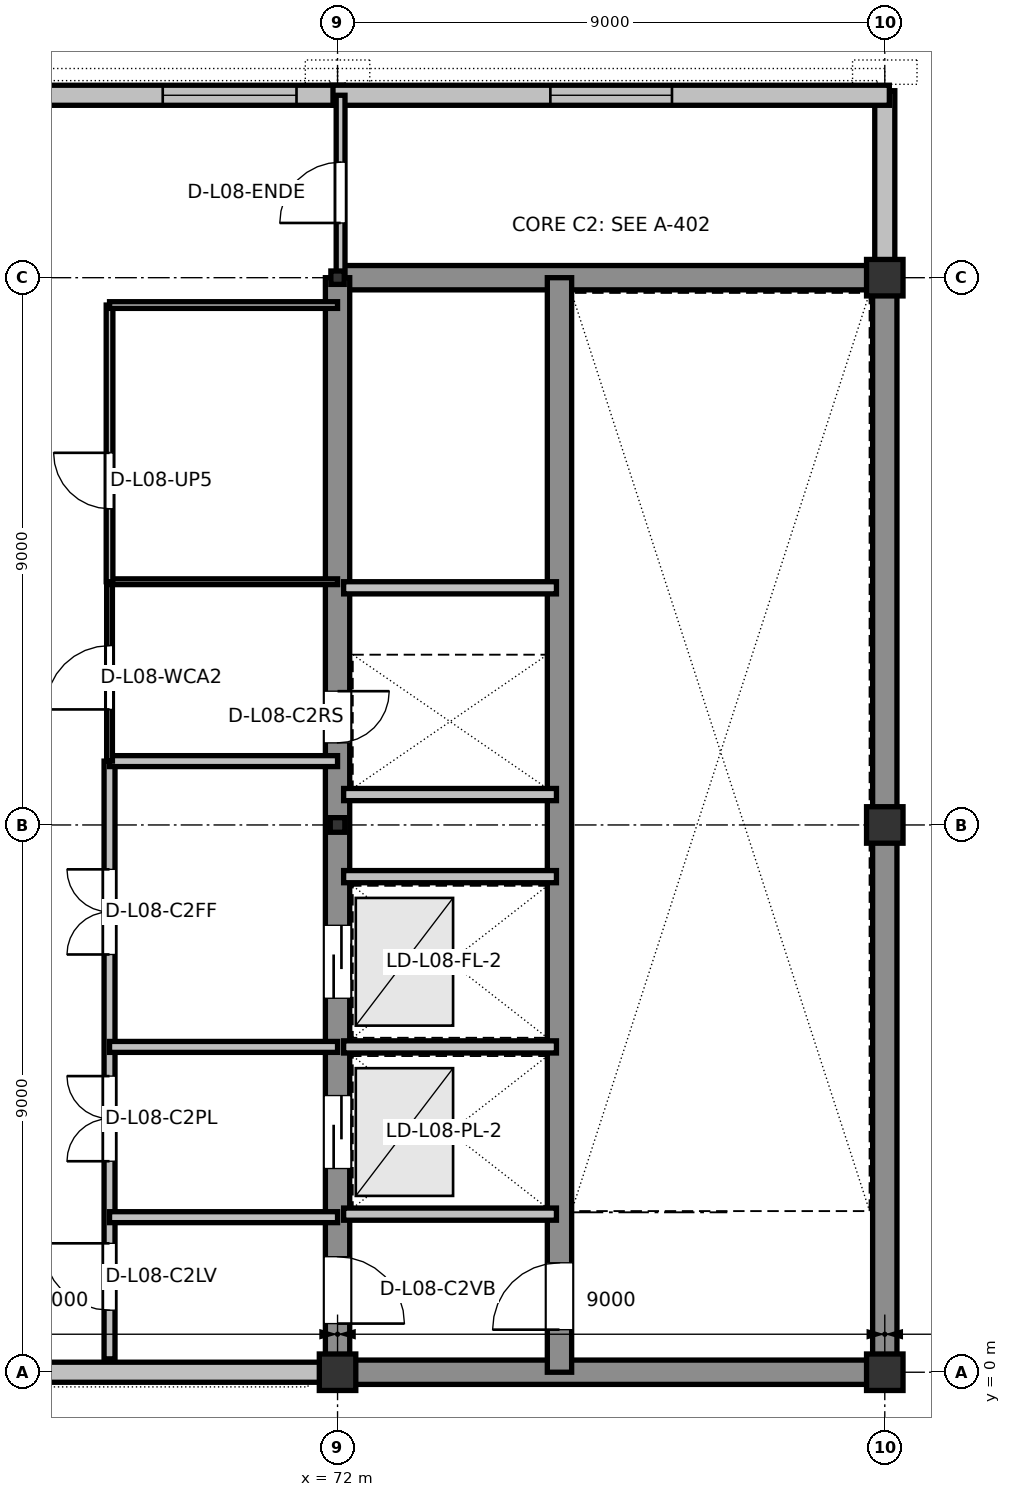
"""IFC4 building model, lengths in metres.
Left out: names, types, materials, properties, quantities, classifications, styles, units other than length and angle.
Written with IfcOpenShell. Run it as: python <this file> out.ifc"""

import sys

from ifc_helpers import new_model, si_unit, direction, frame, frame_2d, origin, origin_2d, place, context, subcontext, project, spatial, rectangle, hollow_rectangle, i_section, extrude, element, fill, save


model = new_model("IFC4")
c1 = context("Model", 3, precision=1e-05, world=origin(), true_north=direction((0.0, 1.0)))
c2 = subcontext(c1, "Body", "Model", "MODEL_VIEW")
j1 = project(units=[si_unit("LENGTHUNIT", "METRE"), si_unit("PLANEANGLEUNIT", "RADIAN")], contexts=[c1])
p1 = place(None, origin())
s1 = spatial("IfcSite", under=j1, at=p1, CompositionType="ELEMENT")
p2 = place(p1, origin())
s2 = spatial("IfcBuilding", under=s1, at=p2, CompositionType="ELEMENT")
p3 = place(p2, frame((0.0, 0.0, 36.0)))
s3 = spatial("IfcBuildingStorey", under=s2, at=p3, CompositionType="ELEMENT", Elevation=36.0)
p4 = place(p3, frame((72.0, 0.0, 0.0), z_axis=(0.0, 0.0, 1.0), x_axis=(1.0, 0.0, 0.0)))
e1 = element("IfcColumn", 1, at=p4, inside=s3, PredefinedType="COLUMN", context=c2, shape_type="SweptSolid", body=[
    extrude(rectangle(XDim=0.6, YDim=0.6, at=origin_2d()), origin(), (0.0, 0.0, 1.0), 4.2),
])
p5 = place(p3, frame((72.0, 9.0, 0.0), z_axis=(0.0, 0.0, 1.0), x_axis=(1.0, 0.0, 0.0)))
e2 = element("IfcColumn", 2, at=p5, inside=s3, PredefinedType="COLUMN", context=c2, shape_type="SweptSolid", body=[
    extrude(i_section(OverallWidth=0.24, OverallDepth=0.24, WebThickness=0.01, FlangeThickness=0.017, at=origin_2d()), origin(), (0.0, 0.0, 1.0), 4.2),
])
p6 = place(p3, frame((72.0, 18.0, 0.0), z_axis=(0.0, 0.0, 1.0), x_axis=(1.0, 0.0, 0.0)))
e3 = element("IfcColumn", 3, at=p6, inside=s3, PredefinedType="COLUMN", context=c2, shape_type="SweptSolid", body=[
    extrude(hollow_rectangle(XDim=0.22, YDim=0.22, WallThickness=0.012, at=origin_2d()), origin(), (0.0, 0.0, 1.0), 4.2),
])
for number, where, z_axis, x_axis in (
    (4, (81.0, 0.0, 0.0), (0.0, 0.0, 1.0), (1.0, 0.0, 0.0)),
    (5, (81.0, 9.0, 0.0), (0.0, 0.0, 1.0), (1.0, 0.0, 0.0)),
    (6, (81.0, 18.0, 0.0), (0.0, 0.0, 1.0), (1.0, 0.0, 0.0)),
):
    element("IfcColumn", number, at=place(p3, frame(where, z_axis=z_axis, x_axis=x_axis)), inside=s3, PredefinedType="COLUMN", context=c2, shape_type="SweptSolid", body=[
        extrude(rectangle(XDim=0.6, YDim=0.6, at=origin_2d()), origin(), (0.0, 0.0, 1.0), 4.2),
    ])
p7 = place(p3, frame((81.0, 18.285, 0.0), z_axis=(0.0, 0.0, 1.0), x_axis=(0.0, 1.0, 0.0)))
e7 = element("IfcWall", 7, at=p7, inside=s3, PredefinedType="STANDARD", context=c2, shape_type="SweptSolid", body=[
    extrude(rectangle(XDim=2.79, YDim=0.33, at=frame_2d((1.395, 0.0))), origin(), (0.0, 0.0, 1.0), 3.94),
])
p8 = place(p3, frame((72.075, 21.0, 0.0), z_axis=(0.0, 0.0, 1.0), x_axis=(-1.0, 0.0, 0.0)))
e8 = element("IfcWall", 8, at=p8, inside=s3, PredefinedType="STANDARD", context=c2, shape_type="SweptSolid", body=[
    extrude(rectangle(XDim=9.15, YDim=0.33, at=frame_2d((4.575, 0.0))), origin(), (0.0, 0.0, 1.0), 3.94),
])
p9 = place(p8, frame((0.75, 0.0, 0.9)))
e9 = element("IfcOpeningElement", 9, at=p9, cuts=e8, PredefinedType="OPENING", context=c2, shape_type="SweptSolid", body=[
    extrude(rectangle(XDim=2.2, YDim=1.65, at=frame_2d((1.1, 0.825))), frame((0.0, 0.175, 0.0), z_axis=(0.0, -1.0, 0.0), x_axis=(1.0, 0.0, 0.0)), (0.0, 0.0, 1.0), 0.35),
])
p10 = place(p3, frame((81.075, 21.0, 0.0), z_axis=(0.0, 0.0, 1.0), x_axis=(-1.0, 0.0, 0.0)))
e10 = element("IfcWall", 10, at=p10, inside=s3, PredefinedType="STANDARD", context=c2, shape_type="SweptSolid", body=[
    extrude(rectangle(XDim=9.15, YDim=0.33, at=frame_2d((4.575, 0.0))), origin(), (0.0, 0.0, 1.0), 3.94),
])
p11 = place(p10, frame((3.575, 0.0, 0.9)))
e11 = element("IfcOpeningElement", 11, at=p11, cuts=e10, PredefinedType="OPENING", context=c2, shape_type="SweptSolid", body=[
    extrude(rectangle(XDim=2.0, YDim=1.6, at=frame_2d((1.0, 0.8))), frame((0.0, 0.175, 0.0), z_axis=(0.0, -1.0, 0.0), x_axis=(1.0, 0.0, 0.0)), (0.0, 0.0, 1.0), 0.35),
])
p12 = place(p3, frame((63.285, 0.0, 0.0), z_axis=(0.0, 0.0, 1.0), x_axis=(1.0, 0.0, 0.0)))
e12 = element("IfcWall", 12, at=p12, inside=s3, PredefinedType="STANDARD", context=c2, shape_type="SweptSolid", body=[
    extrude(rectangle(XDim=8.43, YDim=0.33, at=frame_2d((4.215, 0.0))), origin(), (0.0, 0.0, 1.0), 3.755),
])
p13 = place(p12, frame((0.75, 0.0, 0.9)))
e13 = element("IfcOpeningElement", 13, at=p13, cuts=e12, PredefinedType="OPENING", context=c2, shape_type="SweptSolid", body=[
    extrude(rectangle(XDim=1.0, YDim=1.35, at=frame_2d((0.5, 0.675))), frame((0.0, 0.175, 0.0), z_axis=(0.0, -1.0, 0.0), x_axis=(1.0, 0.0, 0.0)), (0.0, 0.0, 1.0), 0.35),
])
p14 = place(p3, frame((72.0, 0.0, 0.0), z_axis=(0.0, 0.0, 1.0), x_axis=(1.0, 0.0, 0.0)))
e14 = element("IfcWall", 14, at=p14, inside=s3, PredefinedType="SHEAR", context=c2, shape_type="SweptSolid", body=[
    extrude(rectangle(XDim=9.0, YDim=0.4, at=frame_2d((4.5, 0.0))), origin(), (0.0, 0.0, 1.0), 3.96),
])
p15 = place(p3, frame((81.0, 0.0, 0.0), z_axis=(0.0, 0.0, 1.0), x_axis=(0.0, 1.0, 0.0)))
e15 = element("IfcWall", 15, at=p15, inside=s3, PredefinedType="SHEAR", context=c2, shape_type="SweptSolid", body=[
    extrude(rectangle(XDim=18.0, YDim=0.4, at=frame_2d((9.0, 0.0))), origin(), (0.0, 0.0, 1.0), 3.96),
])
p16 = place(p3, frame((81.0, 18.0, 0.0), z_axis=(0.0, 0.0, 1.0), x_axis=(-1.0, 0.0, 0.0)))
e16 = element("IfcWall", 16, at=p16, inside=s3, PredefinedType="SHEAR", context=c2, shape_type="SweptSolid", body=[
    extrude(rectangle(XDim=9.0, YDim=0.4, at=frame_2d((4.5, 0.0))), origin(), (0.0, 0.0, 1.0), 3.96),
])
p17 = place(p3, frame((72.0, 18.0, 0.0), z_axis=(0.0, 0.0, 1.0), x_axis=(0.0, -1.0, 0.0)))
e17 = element("IfcWall", 17, at=p17, inside=s3, PredefinedType="SHEAR", context=c2, shape_type="SweptSolid", body=[
    extrude(rectangle(XDim=18.0, YDim=0.4, at=frame_2d((9.0, 0.0))), origin(), (0.0, 0.0, 1.0), 3.96),
])
p18 = place(p17, frame((16.1, 0.0, 0.0)))
e18 = element("IfcOpeningElement", 18, at=p18, cuts=e17, PredefinedType="OPENING", context=c2, shape_type="SweptSolid", body=[
    extrude(rectangle(XDim=1.1, YDim=2.16, at=frame_2d((0.55, 1.08))), frame((0.0, 0.21, 0.0), z_axis=(0.0, -1.0, 0.0), x_axis=(1.0, 0.0, 0.0)), (0.0, 0.0, 1.0), 0.42),
])
p19 = place(p17, frame((13.45, 0.0, 0.0)))
e19 = element("IfcOpeningElement", 19, at=p19, cuts=e17, PredefinedType="OPENING", context=c2, shape_type="SweptSolid", body=[
    extrude(rectangle(XDim=1.2, YDim=2.2, at=frame_2d((0.6, 1.1))), frame((0.0, 0.21, 0.0), z_axis=(0.0, -1.0, 0.0), x_axis=(1.0, 0.0, 0.0)), (0.0, 0.0, 1.0), 0.42),
])
p20 = place(p17, frame((10.65, 0.0, 0.0)))
e20 = element("IfcOpeningElement", 20, at=p20, cuts=e17, PredefinedType="OPENING", context=c2, shape_type="SweptSolid", body=[
    extrude(rectangle(XDim=1.2, YDim=2.2, at=frame_2d((0.6, 1.1))), frame((0.0, 0.21, 0.0), z_axis=(0.0, -1.0, 0.0), x_axis=(1.0, 0.0, 0.0)), (0.0, 0.0, 1.0), 0.42),
])
p21 = place(p17, frame((6.8, 0.0, 0.0)))
e21 = element("IfcOpeningElement", 21, at=p21, cuts=e17, PredefinedType="OPENING", context=c2, shape_type="SweptSolid", body=[
    extrude(rectangle(XDim=0.85, YDim=2.1, at=frame_2d((0.425, 1.05))), frame((0.0, 0.21, 0.0), z_axis=(0.0, -1.0, 0.0), x_axis=(1.0, 0.0, 0.0)), (0.0, 0.0, 1.0), 0.42),
])
p22 = place(p3, frame((75.65, 0.0, 0.0), z_axis=(0.0, 0.0, 1.0), x_axis=(0.0, 1.0, 0.0)))
e22 = element("IfcWall", 22, at=p22, inside=s3, PredefinedType="SHEAR", context=c2, shape_type="SweptSolid", body=[
    extrude(rectangle(XDim=18.0, YDim=0.4, at=frame_2d((9.0, 0.0))), origin(), (0.0, 0.0, 1.0), 3.96),
])
p23 = place(p22, frame((0.7, 0.0, 0.0)))
e23 = element("IfcOpeningElement", 23, at=p23, cuts=e22, PredefinedType="OPENING", context=c2, shape_type="SweptSolid", body=[
    extrude(rectangle(XDim=1.1, YDim=2.16, at=frame_2d((0.55, 1.08))), frame((0.0, 0.21, 0.0), z_axis=(0.0, -1.0, 0.0), x_axis=(1.0, 0.0, 0.0)), (0.0, 0.0, 1.0), 0.42),
])
for number, where, z_axis, x_axis in (
    (24, (72.1, 2.6, 0.0), (0.0, 0.0, 1.0), (1.0, 0.0, 0.0)),
    (25, (72.1, 5.35, 0.0), (0.0, 0.0, 1.0), (1.0, 0.0, 0.0)),
    (26, (72.1, 8.15, 0.0), (0.0, 0.0, 1.0), (1.0, 0.0, 0.0)),
    (27, (72.1, 9.5, 0.0), (0.0, 0.0, 1.0), (1.0, 0.0, 0.0)),
    (28, (72.1, 12.9, 0.0), (0.0, 0.0, 1.0), (1.0, 0.0, 0.0)),
):
    element("IfcWall", number, at=place(p3, frame(where, z_axis=z_axis, x_axis=x_axis)), inside=s3, PredefinedType="PARTITIONING", context=c2, shape_type="SweptSolid", body=[
        extrude(rectangle(XDim=3.5, YDim=0.2, at=frame_2d((1.75, 0.0))), origin(), (0.0, 0.0, 1.0), 3.96),
    ])
p24 = place(p3, frame((68.25, 0.22, 0.0), z_axis=(0.0, 0.0, 1.0), x_axis=(0.0, 1.0, 0.0)))
e29 = element("IfcWall", 29, at=p24, inside=s3, PredefinedType="PARTITIONING", context=c2, shape_type="SweptSolid", body=[
    extrude(rectangle(XDim=9.83, YDim=0.18, at=frame_2d((4.915, 0.0))), origin(), (0.0, 0.0, 1.0), 3.96),
])
p25 = place(p24, frame((0.8, 0.0, 0.0)))
e30 = element("IfcOpeningElement", 30, at=p25, cuts=e29, PredefinedType="OPENING", context=c2, shape_type="SweptSolid", body=[
    extrude(rectangle(XDim=1.1, YDim=2.16, at=frame_2d((0.55, 1.08))), frame((0.0, 0.1, 0.0), z_axis=(0.0, -1.0, 0.0), x_axis=(1.0, 0.0, 0.0)), (0.0, 0.0, 1.0), 0.2),
])
p26 = place(p24, frame((3.25, 0.0, 0.0)))
e31 = element("IfcOpeningElement", 31, at=p26, cuts=e29, PredefinedType="OPENING", context=c2, shape_type="SweptSolid", body=[
    extrude(rectangle(XDim=1.4, YDim=2.2, at=frame_2d((0.7, 1.1))), frame((0.0, 0.1, 0.0), z_axis=(0.0, -1.0, 0.0), x_axis=(1.0, 0.0, 0.0)), (0.0, 0.0, 1.0), 0.2),
])
p27 = place(p24, frame((6.65, 0.0, 0.0)))
e32 = element("IfcOpeningElement", 32, at=p27, cuts=e29, PredefinedType="OPENING", context=c2, shape_type="SweptSolid", body=[
    extrude(rectangle(XDim=1.4, YDim=2.2, at=frame_2d((0.7, 1.1))), frame((0.0, 0.1, 0.0), z_axis=(0.0, -1.0, 0.0), x_axis=(1.0, 0.0, 0.0)), (0.0, 0.0, 1.0), 0.2),
])
for number, where, z_axis, x_axis in (
    (33, (68.25, 2.55, 0.0), (0.0, 0.0, 1.0), (1.0, 0.0, 0.0)),
    (34, (68.25, 5.35, 0.0), (0.0, 0.0, 1.0), (1.0, 0.0, 0.0)),
    (35, (68.25, 10.05, 0.0), (0.0, 0.0, 1.0), (1.0, 0.0, 0.0)),
):
    element("IfcWall", number, at=place(p3, frame(where, z_axis=z_axis, x_axis=x_axis)), inside=s3, PredefinedType="PARTITIONING", context=c2, shape_type="SweptSolid", body=[
        extrude(rectangle(XDim=3.75, YDim=0.18, at=frame_2d((1.875, 0.0))), origin(), (0.0, 0.0, 1.0), 3.96),
    ])
p28 = place(p3, frame((68.25, 10.05, 0.0), z_axis=(0.0, 0.0, 1.0), x_axis=(0.0, 1.0, 0.0)))
e36 = element("IfcWall", 36, at=p28, inside=s3, PredefinedType="PARTITIONING", context=c2, shape_type="SweptSolid", body=[
    extrude(rectangle(XDim=2.95, YDim=0.095, at=frame_2d((1.475, 0.0))), origin(), (0.0, 0.0, 1.0), 3.96),
])
p29 = place(p28, frame((0.85, 0.0, 0.0)))
e37 = element("IfcOpeningElement", 37, at=p29, cuts=e36, PredefinedType="OPENING", context=c2, shape_type="SweptSolid", body=[
    extrude(rectangle(XDim=1.05, YDim=2.13, at=frame_2d((0.525, 1.065))), frame((0.0, 0.057, 0.0), z_axis=(0.0, -1.0, 0.0), x_axis=(1.0, 0.0, 0.0)), (0.0, 0.0, 1.0), 0.115),
])
p30 = place(p3, frame((68.25, 13.0, 0.0), z_axis=(0.0, 0.0, 1.0), x_axis=(1.0, 0.0, 0.0)))
e38 = element("IfcWall", 38, at=p30, inside=s3, PredefinedType="PARTITIONING", context=c2, shape_type="SweptSolid", body=[
    extrude(rectangle(XDim=3.75, YDim=0.095, at=frame_2d((1.875, 0.0))), origin(), (0.0, 0.0, 1.0), 3.96),
])
p31 = place(p3, frame((72.05, 18.0, 0.0), z_axis=(0.0, 0.0, 1.0), x_axis=(0.0, 1.0, 0.0)))
e39 = element("IfcWall", 39, at=p31, inside=s3, PredefinedType="PARTITIONING", context=c2, shape_type="SweptSolid", body=[
    extrude(rectangle(XDim=3.0, YDim=0.145, at=frame_2d((1.5, 0.0))), origin(), (0.0, 0.0, 1.0), 3.96),
])
p32 = place(p31, frame((0.9, 0.0, 0.0)))
e40 = element("IfcOpeningElement", 40, at=p32, cuts=e39, PredefinedType="OPENING", context=c2, shape_type="SweptSolid", body=[
    extrude(rectangle(XDim=1.0, YDim=2.14, at=frame_2d((0.5, 1.07))), frame((0.0, 0.083, 0.0), z_axis=(0.0, -1.0, 0.0), x_axis=(1.0, 0.0, 0.0)), (0.0, 0.0, 1.0), 0.165),
])
p33 = place(p3, frame((68.25, 13.0, 0.0), z_axis=(0.0, 0.0, 1.0), x_axis=(0.0, 1.0, 0.0)))
e41 = element("IfcWall", 41, at=p33, inside=s3, PredefinedType="PARTITIONING", context=c2, shape_type="SweptSolid", body=[
    extrude(rectangle(XDim=4.55, YDim=0.11, at=frame_2d((2.275, 0.0))), origin(), (0.0, 0.0, 1.0), 3.96),
])
p34 = place(p33, frame((1.2, 0.0, 0.0)))
e42 = element("IfcOpeningElement", 42, at=p34, cuts=e41, PredefinedType="OPENING", context=c2, shape_type="SweptSolid", body=[
    extrude(rectangle(XDim=0.92, YDim=2.1, at=frame_2d((0.46, 1.05))), frame((0.0, 0.065, 0.0), z_axis=(0.0, -1.0, 0.0), x_axis=(1.0, 0.0, 0.0)), (0.0, 0.0, 1.0), 0.13),
])
p35 = place(p3, frame((68.25, 17.55, 0.0), z_axis=(0.0, 0.0, 1.0), x_axis=(1.0, 0.0, 0.0)))
e43 = element("IfcWall", 43, at=p35, inside=s3, PredefinedType="PARTITIONING", context=c2, shape_type="SweptSolid", body=[
    extrude(rectangle(XDim=3.75, YDim=0.11, at=frame_2d((1.875, 0.0))), origin(), (0.0, 0.0, 1.0), 3.96),
])
p36 = place(p9, origin())
e44 = element("IfcWindow", 44, at=p36, inside=s3, PartitioningType="SINGLE_PANEL", PredefinedType="WINDOW", context=c2, shape_type="SweptSolid", body=[
    extrude(rectangle(XDim=2.2, YDim=1.65, at=frame_2d((1.1, 0.825))), frame((0.0, 0.03, 0.0), z_axis=(0.0, -1.0, 0.0), x_axis=(1.0, 0.0, 0.0)), (0.0, 0.0, 1.0), 0.06),
])
fill(e9, e44)
p37 = place(p11, origin())
e45 = element("IfcWindow", 45, at=p37, inside=s3, PartitioningType="SINGLE_PANEL", PredefinedType="WINDOW", context=c2, shape_type="SweptSolid", body=[
    extrude(rectangle(XDim=2.0, YDim=1.6, at=frame_2d((1.0, 0.8))), frame((0.0, 0.03, 0.0), z_axis=(0.0, -1.0, 0.0), x_axis=(1.0, 0.0, 0.0)), (0.0, 0.0, 1.0), 0.06),
])
fill(e11, e45)
p38 = place(p23, origin())
e46 = element("IfcDoor", 46, at=p38, inside=s3, OperationType="SINGLE_SWING_LEFT", PredefinedType="DOOR", context=c2, shape_type="SweptSolid", body=[
    extrude(rectangle(XDim=1.1, YDim=2.16, at=frame_2d((0.55, 1.08))), frame((0.0, 0.025, 0.0), z_axis=(0.0, -1.0, 0.0), x_axis=(1.0, 0.0, 0.0)), (0.0, 0.0, 1.0), 0.05),
])
fill(e23, e46)
p39 = place(p18, origin())
e47 = element("IfcDoor", 47, at=p39, inside=s3, OperationType="SINGLE_SWING_RIGHT", PredefinedType="DOOR", context=c2, shape_type="SweptSolid", body=[
    extrude(rectangle(XDim=1.1, YDim=2.16, at=frame_2d((0.55, 1.08))), frame((0.0, 0.025, 0.0), z_axis=(0.0, -1.0, 0.0), x_axis=(1.0, 0.0, 0.0)), (0.0, 0.0, 1.0), 0.05),
])
fill(e18, e47)
p40 = place(p19, origin())
e48 = element("IfcDoor", 48, at=p40, inside=s3, OperationType="SLIDING_TO_LEFT", PredefinedType="DOOR", context=c2, shape_type="SweptSolid", body=[
    extrude(rectangle(XDim=1.2, YDim=2.2, at=frame_2d((0.6, 1.1))), frame((0.0, 0.025, 0.0), z_axis=(0.0, -1.0, 0.0), x_axis=(1.0, 0.0, 0.0)), (0.0, 0.0, 1.0), 0.05),
])
fill(e19, e48)
p41 = place(p20, origin())
e49 = element("IfcDoor", 49, at=p41, inside=s3, OperationType="SLIDING_TO_LEFT", PredefinedType="DOOR", context=c2, shape_type="SweptSolid", body=[
    extrude(rectangle(XDim=1.2, YDim=2.2, at=frame_2d((0.6, 1.1))), frame((0.0, 0.025, 0.0), z_axis=(0.0, -1.0, 0.0), x_axis=(1.0, 0.0, 0.0)), (0.0, 0.0, 1.0), 0.05),
])
fill(e20, e49)
p42 = place(p21, origin())
e50 = element("IfcDoor", 50, at=p42, inside=s3, OperationType="SINGLE_SWING_LEFT", PredefinedType="DOOR", context=c2, shape_type="SweptSolid", body=[
    extrude(rectangle(XDim=0.85, YDim=2.1, at=frame_2d((0.425, 1.05))), frame((0.0, 0.025, 0.0), z_axis=(0.0, -1.0, 0.0), x_axis=(1.0, 0.0, 0.0)), (0.0, 0.0, 1.0), 0.05),
])
fill(e21, e50)
p43 = place(p25, origin())
e51 = element("IfcDoor", 51, at=p43, inside=s3, OperationType="SINGLE_SWING_RIGHT", PredefinedType="DOOR", context=c2, shape_type="SweptSolid", body=[
    extrude(rectangle(XDim=1.1, YDim=2.16, at=frame_2d((0.55, 1.08))), frame((0.0, 0.025, 0.0), z_axis=(0.0, -1.0, 0.0), x_axis=(1.0, 0.0, 0.0)), (0.0, 0.0, 1.0), 0.05),
])
fill(e30, e51)
p44 = place(p26, origin())
e52 = element("IfcDoor", 52, at=p44, inside=s3, OperationType="DOUBLE_DOOR_SINGLE_SWING", PredefinedType="DOOR", context=c2, shape_type="SweptSolid", body=[
    extrude(rectangle(XDim=1.4, YDim=2.2, at=frame_2d((0.7, 1.1))), frame((0.0, 0.025, 0.0), z_axis=(0.0, -1.0, 0.0), x_axis=(1.0, 0.0, 0.0)), (0.0, 0.0, 1.0), 0.05),
])
fill(e31, e52)
p45 = place(p27, origin())
e53 = element("IfcDoor", 53, at=p45, inside=s3, OperationType="DOUBLE_DOOR_SINGLE_SWING", PredefinedType="DOOR", context=c2, shape_type="SweptSolid", body=[
    extrude(rectangle(XDim=1.4, YDim=2.2, at=frame_2d((0.7, 1.1))), frame((0.0, 0.025, 0.0), z_axis=(0.0, -1.0, 0.0), x_axis=(1.0, 0.0, 0.0)), (0.0, 0.0, 1.0), 0.05),
])
fill(e32, e53)
p46 = place(p29, origin())
e54 = element("IfcDoor", 54, at=p46, inside=s3, OperationType="SINGLE_SWING_LEFT", PredefinedType="DOOR", context=c2, shape_type="SweptSolid", body=[
    extrude(rectangle(XDim=1.05, YDim=2.13, at=frame_2d((0.525, 1.065))), frame((0.0, 0.025, 0.0), z_axis=(0.0, -1.0, 0.0), x_axis=(1.0, 0.0, 0.0)), (0.0, 0.0, 1.0), 0.05),
])
fill(e37, e54)
p47 = place(p32, origin())
e55 = element("IfcDoor", 55, at=p47, inside=s3, OperationType="SINGLE_SWING_LEFT", PredefinedType="DOOR", context=c2, shape_type="SweptSolid", body=[
    extrude(rectangle(XDim=1.0, YDim=2.14, at=frame_2d((0.5, 1.07))), frame((0.0, 0.025, 0.0), z_axis=(0.0, -1.0, 0.0), x_axis=(1.0, 0.0, 0.0)), (0.0, 0.0, 1.0), 0.05),
])
fill(e40, e55)
p48 = place(p34, origin())
e56 = element("IfcDoor", 56, at=p48, inside=s3, OperationType="SINGLE_SWING_RIGHT", PredefinedType="DOOR", context=c2, shape_type="SweptSolid", body=[
    extrude(rectangle(XDim=0.92, YDim=2.1, at=frame_2d((0.46, 1.05))), frame((0.0, 0.025, 0.0), z_axis=(0.0, -1.0, 0.0), x_axis=(1.0, 0.0, 0.0)), (0.0, 0.0, 1.0), 0.05),
])
fill(e42, e56)
save(model, sys.argv[1])
